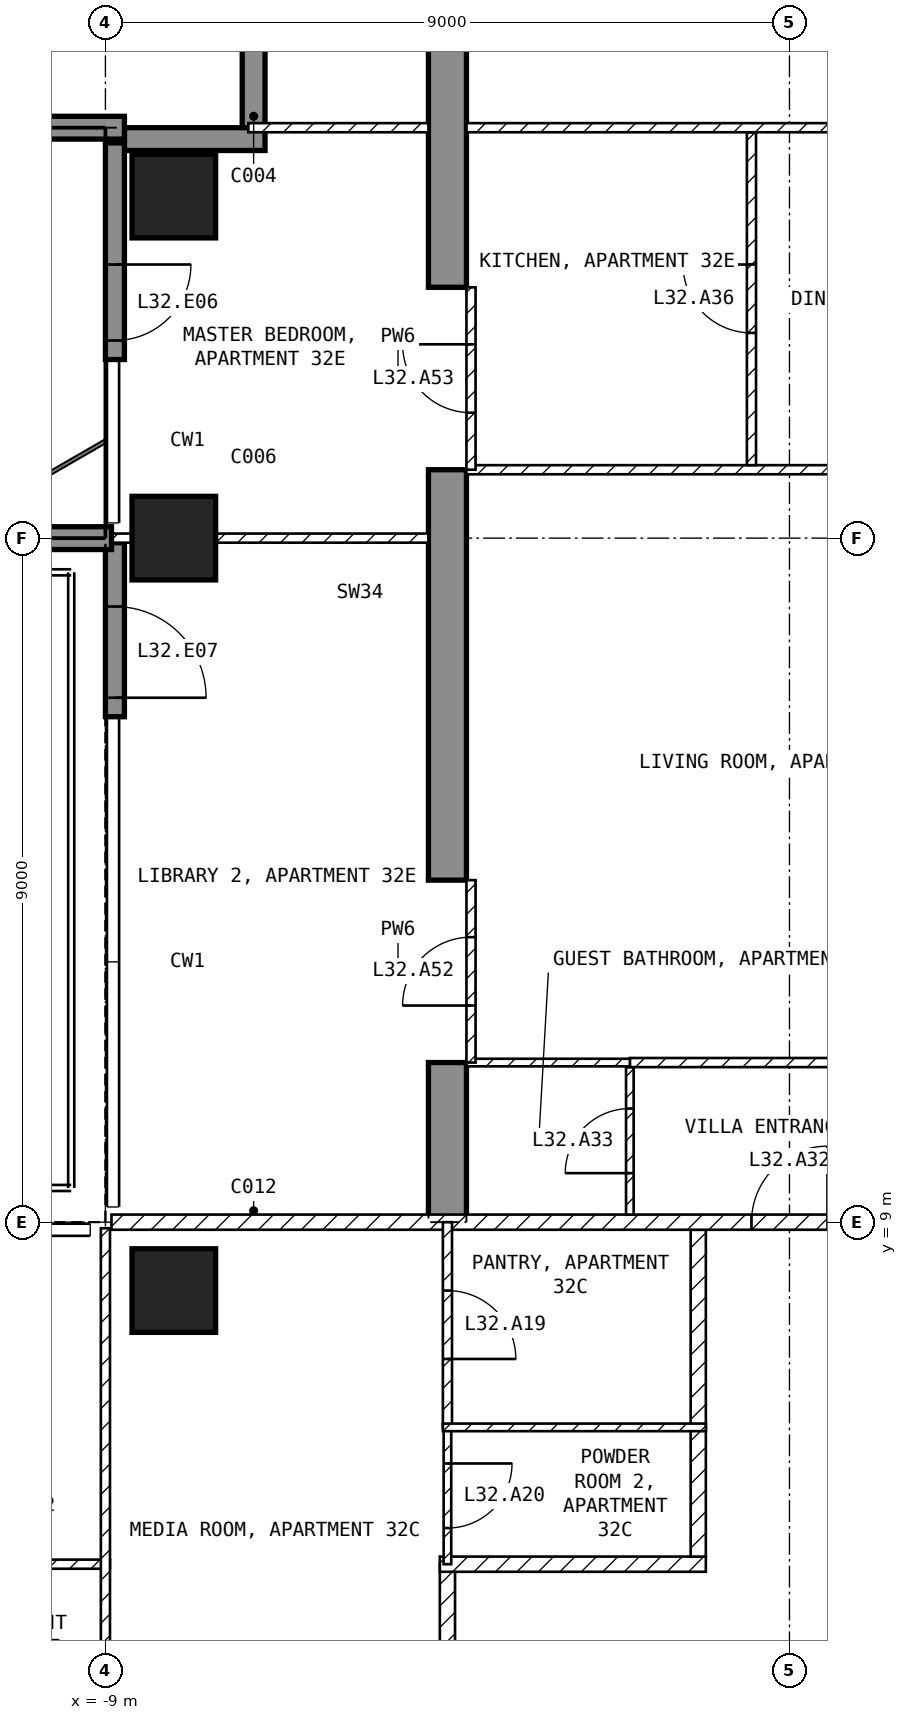
"""IFC4 building model, lengths in metres.
Left out: names, types, materials, properties, quantities, classifications, styles, units other than length and angle.
Written with IfcOpenShell. Run it as: python <this file> out.ifc"""

import sys

from ifc_helpers import new_model, si_unit, direction, frame, frame_2d, origin, origin_2d, place, context, subcontext, project, spatial, polyline, rectangle, outline, extrude, element, fill, save


model = new_model("IFC4")
c1 = context("Model", 3, precision=1e-05, world=origin(), true_north=direction((0.0, 1.0)))
c2 = subcontext(c1, "Body", "Model", "MODEL_VIEW")
j1 = project(units=[si_unit("LENGTHUNIT", "METRE"), si_unit("PLANEANGLEUNIT", "RADIAN")], contexts=[c1])
p1 = place(None, origin())
s1 = spatial("IfcSite", under=j1, at=p1, CompositionType="ELEMENT")
p2 = place(p1, origin())
s2 = spatial("IfcBuilding", under=s1, at=p2, CompositionType="ELEMENT")
p3 = place(p2, frame((0.0, 0.0, 133.9)))
s3 = spatial("IfcBuildingStorey", under=s2, at=p3, CompositionType="ELEMENT", Elevation=133.9)
for number, where, z_axis, x_axis in (
    (1, (-8.1, 8.1, -0.25), (0.0, 0.0, 1.0), (1.0, 0.0, 0.0)),
    (2, (-8.1, 18.0, -0.25), (0.0, 0.0, 1.0), (1.0, 0.0, 0.0)),
    (3, (-8.1, 22.5, -0.25), (0.0, 0.0, 1.0), (1.0, 0.0, 0.0)),
):
    element("IfcColumn", number, at=place(p3, frame(where, z_axis=z_axis, x_axis=x_axis)), inside=s3, PredefinedType="COLUMN", context=c2, shape_type="SweptSolid", body=[
        extrude(rectangle(XDim=1.1, YDim=1.1, at=origin_2d()), origin(), (0.0, 0.0, 1.0), 3.5),
    ])
p4 = place(p3, frame((-4.75, 9.0, -0.25), z_axis=(1.0, 0.0, 0.0), x_axis=(0.0, 1.0, 0.0)))
e4 = element("IfcWall", 4, at=p4, inside=s3, PredefinedType="SHEAR", context=c2, shape_type="SweptSolid", body=[
    extrude(outline(polyline([(0.0, 0.0), (2.1, 0.0), (2.1, 2.65), (4.5, 2.65), (4.5, 0.0), (9.9, 0.0), (9.9, 2.65), (12.3, 2.65), (12.3, 0.0), (16.55, 0.0), (16.55, 3.5), (0.0, 3.5), (0.0, 0.0)])), origin(), (0.0, 0.0, 1.0), 0.5),
])
p5 = place(p3, frame((-8.875, 23.2, 0.0), z_axis=(0.0, 0.0, 1.0), x_axis=(0.0, -1.0, 0.0)))
e5 = element("IfcWall", 5, at=p5, inside=s3, PredefinedType="SOLIDWALL", context=c2, shape_type="SweptSolid", body=[
    extrude(rectangle(XDim=2.85, YDim=0.25, at=frame_2d((1.425, 0.0))), origin(), (0.0, 0.0, 1.0), 3.25),
])
p6 = place(p5, frame((1.6, 0.0, 0.0)))
e6 = element("IfcOpeningElement", 6, at=p6, cuts=e5, PredefinedType="OPENING", context=c2, shape_type="SweptSolid", body=[
    extrude(rectangle(XDim=1.0, YDim=2.4, at=frame_2d((0.5, 1.2))), frame((0.0, 0.135, 0.0), z_axis=(0.0, -1.0, 0.0), x_axis=(1.0, 0.0, 0.0)), (0.0, 0.0, 1.0), 0.27),
])
p7 = place(p3, frame((-8.875, 17.94, 0.0), z_axis=(0.0, 0.0, 1.0), x_axis=(0.0, -1.0, 0.0)))
e7 = element("IfcWall", 7, at=p7, inside=s3, PredefinedType="SOLIDWALL", context=c2, shape_type="SweptSolid", body=[
    extrude(rectangle(XDim=2.29, YDim=0.25, at=frame_2d((1.145, 0.0))), origin(), (0.0, 0.0, 1.0), 3.25),
])
p8 = place(p7, frame((0.84, 0.0, 0.0)))
e8 = element("IfcOpeningElement", 8, at=p8, cuts=e7, PredefinedType="OPENING", context=c2, shape_type="SweptSolid", body=[
    extrude(rectangle(XDim=1.2, YDim=2.4, at=frame_2d((0.6, 1.2))), frame((0.0, 0.135, 0.0), z_axis=(0.0, -1.0, 0.0), x_axis=(1.0, 0.0, 0.0)), (0.0, 0.0, 1.0), 0.27),
])
p9 = place(p3, frame((-7.05, 25.2, 0.0), z_axis=(0.0, 0.0, 1.0), x_axis=(0.0, -1.0, 0.0)))
e9 = element("IfcWall", 9, at=p9, inside=s3, PredefinedType="SOLIDWALL", context=c2, shape_type="SweptSolid", body=[
    extrude(rectangle(XDim=1.8, YDim=0.3, at=frame_2d((0.9, 0.0))), origin(), (0.0, 0.0, 1.0), 3.25),
])
p10 = place(p3, frame((-6.9, 23.25, 0.0), z_axis=(0.0, 0.0, 1.0), x_axis=(-1.0, 0.0, 0.0)))
e10 = element("IfcWall", 10, at=p10, inside=s3, PredefinedType="SOLIDWALL", context=c2, shape_type="SweptSolid", body=[
    extrude(rectangle(XDim=1.85, YDim=0.3, at=frame_2d((0.925, 0.0))), origin(), (0.0, 0.0, 1.0), 3.25),
])
p11 = place(p3, frame((-8.92, 18.0, 0.0), z_axis=(0.0, 0.0, 1.0), x_axis=(-1.0, 0.0, 0.0)))
e11 = element("IfcWall", 11, at=p11, inside=s3, PredefinedType="SOLIDWALL", context=c2, shape_type="SweptSolid", body=[
    extrude(rectangle(XDim=2.82, YDim=0.3, at=frame_2d((1.41, 0.0))), origin(), (0.0, 0.0, 1.0), 3.25),
])
p12 = place(p3, frame((-8.75, 23.4, 0.0), z_axis=(0.0, 0.0, 1.0), x_axis=(-1.0, 0.0, 0.0)))
e12 = element("IfcWall", 12, at=p12, inside=s3, PredefinedType="SOLIDWALL", context=c2, shape_type="SweptSolid", body=[
    extrude(rectangle(XDim=2.95, YDim=0.3, at=frame_2d((1.475, 0.0))), origin(), (0.0, 0.0, 1.0), 3.25),
])
p13 = place(p3, frame((-4.5, 1.3, 0.0), z_axis=(0.0, 0.0, 1.0), x_axis=(0.0, 1.0, 0.0)))
e13 = element("IfcWall", 13, at=p13, inside=s3, PredefinedType="PARTITIONING", context=c2, shape_type="SweptSolid", body=[
    extrude(rectangle(XDim=3.2, YDim=0.2, at=frame_2d((1.6, 0.0))), origin(), (0.0, 0.0, 1.0), 3.25),
])
p14 = place(p3, frame((-4.6, 4.5, 0.0), z_axis=(0.0, 0.0, 1.0), x_axis=(1.0, 0.0, 0.0)))
e14 = element("IfcWall", 14, at=p14, inside=s3, PredefinedType="PARTITIONING", context=c2, shape_type="SweptSolid", body=[
    extrude(rectangle(XDim=3.5, YDim=0.2, at=frame_2d((1.75, 0.0))), origin(), (0.0, 0.0, 1.0), 3.25),
])
p15 = place(p3, frame((-1.2, 4.6, 0.0), z_axis=(0.0, 0.0, 1.0), x_axis=(0.0, 1.0, 0.0)))
e15 = element("IfcWall", 15, at=p15, inside=s3, PredefinedType="PARTITIONING", context=c2, shape_type="SweptSolid", body=[
    extrude(rectangle(XDim=4.3, YDim=0.2, at=frame_2d((2.15, 0.0))), origin(), (0.0, 0.0, 1.0), 3.25),
])
p16 = place(p3, frame((-8.92, 9.0, 0.0), z_axis=(0.0, 0.0, 1.0), x_axis=(1.0, 0.0, 0.0)))
e16 = element("IfcWall", 16, at=p16, inside=s3, PredefinedType="PARTITIONING", context=c2, shape_type="SweptSolid", body=[
    extrude(rectangle(XDim=17.84, YDim=0.2, at=frame_2d((8.92, 0.0))), origin(), (0.0, 0.0, 1.0), 3.25),
])
p17 = place(p16, frame((8.42, 0.0, 0.0)))
e17 = element("IfcOpeningElement", 17, at=p17, cuts=e16, PredefinedType="OPENING", context=c2, shape_type="SweptSolid", body=[
    extrude(rectangle(XDim=1.0, YDim=2.1, at=frame_2d((0.5, 1.05))), frame((0.0, 0.11, 0.0), z_axis=(0.0, -1.0, 0.0), x_axis=(1.0, 0.0, 0.0)), (0.0, 0.0, 1.0), 0.22),
])
p18 = place(p3, frame((-14.4, 4.5, 0.0), z_axis=(0.0, 0.0, 1.0), x_axis=(1.0, 0.0, 0.0)))
e18 = element("IfcWall", 18, at=p18, inside=s3, PredefinedType="PARTITIONING", context=c2, shape_type="SweptSolid", body=[
    extrude(rectangle(XDim=5.46, YDim=0.12, at=frame_2d((2.73, 0.0))), origin(), (0.0, 0.0, 1.0), 3.25),
])
p19 = place(p18, frame((3.75, 0.0, 0.0)))
e19 = element("IfcOpeningElement", 19, at=p19, cuts=e18, PredefinedType="OPENING", context=c2, shape_type="SweptSolid", body=[
    extrude(rectangle(XDim=0.9, YDim=2.1, at=frame_2d((0.45, 1.05))), frame((0.0, 0.07, 0.0), z_axis=(0.0, -1.0, 0.0), x_axis=(1.0, 0.0, 0.0)), (0.0, 0.0, 1.0), 0.14),
])
p20 = place(p3, frame((-9.0, 8.92, 0.0), z_axis=(0.0, 0.0, 1.0), x_axis=(0.0, -1.0, 0.0)))
e20 = element("IfcWall", 20, at=p20, inside=s3, PredefinedType="PARTITIONING", context=c2, shape_type="SweptSolid", body=[
    extrude(rectangle(XDim=7.62, YDim=0.12, at=frame_2d((3.81, 0.0))), origin(), (0.0, 0.0, 1.0), 3.25),
])
p21 = place(p20, frame((5.57, 0.0, 0.0)))
e21 = element("IfcOpeningElement", 21, at=p21, cuts=e20, PredefinedType="OPENING", context=c2, shape_type="SweptSolid", body=[
    extrude(rectangle(XDim=0.9, YDim=2.1, at=frame_2d((0.45, 1.05))), frame((0.0, 0.07, 0.0), z_axis=(0.0, -1.0, 0.0), x_axis=(1.0, 0.0, 0.0)), (0.0, 0.0, 1.0), 0.14),
])
p22 = place(p3, frame((-4.5, 6.3, 0.0), z_axis=(0.0, 0.0, 1.0), x_axis=(0.0, -1.0, 0.0)))
e22 = element("IfcWall", 22, at=p22, inside=s3, PredefinedType="PARTITIONING", context=c2, shape_type="SweptSolid", body=[
    extrude(rectangle(XDim=1.8, YDim=0.1, at=frame_2d((0.9, 0.0))), origin(), (0.0, 0.0, 1.0), 3.25),
])
p23 = place(p22, frame((0.475, 0.0, 0.0)))
e23 = element("IfcOpeningElement", 23, at=p23, cuts=e22, PredefinedType="OPENING", context=c2, shape_type="SweptSolid", body=[
    extrude(rectangle(XDim=0.85, YDim=2.1, at=frame_2d((0.425, 1.05))), frame((0.0, 0.06, 0.0), z_axis=(0.0, -1.0, 0.0), x_axis=(1.0, 0.0, 0.0)), (0.0, 0.0, 1.0), 0.12),
])
p24 = place(p3, frame((-4.5, 9.0, 0.0), z_axis=(0.0, 0.0, 1.0), x_axis=(0.0, -1.0, 0.0)))
e24 = element("IfcWall", 24, at=p24, inside=s3, PredefinedType="PARTITIONING", context=c2, shape_type="SweptSolid", body=[
    extrude(rectangle(XDim=2.7, YDim=0.12, at=frame_2d((1.35, 0.0))), origin(), (0.0, 0.0, 1.0), 3.25),
])
p25 = place(p24, frame((0.9, 0.0, 0.0)))
e25 = element("IfcOpeningElement", 25, at=p25, cuts=e24, PredefinedType="OPENING", context=c2, shape_type="SweptSolid", body=[
    extrude(rectangle(XDim=0.9, YDim=2.1, at=frame_2d((0.45, 1.05))), frame((0.0, 0.07, 0.0), z_axis=(0.0, -1.0, 0.0), x_axis=(1.0, 0.0, 0.0)), (0.0, 0.0, 1.0), 0.14),
])
p26 = place(p3, frame((-4.56, 6.3, 0.0), z_axis=(0.0, 0.0, 1.0), x_axis=(1.0, 0.0, 0.0)))
e26 = element("IfcWall", 26, at=p26, inside=s3, PredefinedType="PARTITIONING", context=c2, shape_type="SweptSolid", body=[
    extrude(rectangle(XDim=3.46, YDim=0.1, at=frame_2d((1.73, 0.0))), origin(), (0.0, 0.0, 1.0), 3.25),
])
p27 = place(p3, frame((-2.1, 9.1, 0.0), z_axis=(0.0, 0.0, 1.0), x_axis=(0.0, 1.0, 0.0)))
e27 = element("IfcWall", 27, at=p27, inside=s3, PredefinedType="PARTITIONING", context=c2, shape_type="SweptSolid", body=[
    extrude(rectangle(XDim=1.94, YDim=0.1, at=frame_2d((0.97, 0.0))), origin(), (0.0, 0.0, 1.0), 3.25),
])
p28 = place(p27, frame((0.545, 0.0, 0.0)))
e28 = element("IfcOpeningElement", 28, at=p28, cuts=e27, PredefinedType="OPENING", context=c2, shape_type="SweptSolid", body=[
    extrude(rectangle(XDim=0.85, YDim=2.1, at=frame_2d((0.425, 1.05))), frame((0.0, 0.06, 0.0), z_axis=(0.0, -1.0, 0.0), x_axis=(1.0, 0.0, 0.0)), (0.0, 0.0, 1.0), 0.12),
])
p29 = place(p3, frame((-2.1, 11.1, 0.0), z_axis=(0.0, 0.0, 1.0), x_axis=(1.0, 0.0, 0.0)))
e29 = element("IfcWall", 29, at=p29, inside=s3, PredefinedType="PARTITIONING", context=c2, shape_type="SweptSolid", body=[
    extrude(rectangle(XDim=6.35, YDim=0.12, at=frame_2d((3.175, 0.0))), origin(), (0.0, 0.0, 1.0), 3.25),
])
p30 = place(p29, frame((2.725, 0.0, 0.0)))
e30 = element("IfcOpeningElement", 30, at=p30, cuts=e29, PredefinedType="OPENING", context=c2, shape_type="SweptSolid", body=[
    extrude(rectangle(XDim=0.9, YDim=2.1, at=frame_2d((0.45, 1.05))), frame((0.0, 0.07, 0.0), z_axis=(0.0, -1.0, 0.0), x_axis=(1.0, 0.0, 0.0)), (0.0, 0.0, 1.0), 0.14),
])
p31 = place(p3, frame((-4.25, 11.1, 0.0), z_axis=(0.0, 0.0, 1.0), x_axis=(1.0, 0.0, 0.0)))
e31 = element("IfcWall", 31, at=p31, inside=s3, PredefinedType="PARTITIONING", context=c2, shape_type="SweptSolid", body=[
    extrude(rectangle(XDim=2.15, YDim=0.1, at=frame_2d((1.075, 0.0))), origin(), (0.0, 0.0, 1.0), 3.25),
])
p32 = place(p3, frame((-4.25, 18.9, 0.0), z_axis=(0.0, 0.0, 1.0), x_axis=(1.0, 0.0, 0.0)))
e32 = element("IfcWall", 32, at=p32, inside=s3, PredefinedType="PARTITIONING", context=c2, shape_type="SweptSolid", body=[
    extrude(rectangle(XDim=8.5, YDim=0.12, at=frame_2d((4.25, 0.0))), origin(), (0.0, 0.0, 1.0), 3.25),
])
p33 = place(p32, frame((5.675, 0.0, 0.0)))
e33 = element("IfcOpeningElement", 33, at=p33, cuts=e32, PredefinedType="OPENING", context=c2, shape_type="SweptSolid", body=[
    extrude(rectangle(XDim=0.9, YDim=2.1, at=frame_2d((0.45, 1.05))), frame((0.0, 0.07, 0.0), z_axis=(0.0, -1.0, 0.0), x_axis=(1.0, 0.0, 0.0)), (0.0, 0.0, 1.0), 0.14),
])
p34 = place(p3, frame((-0.5, 18.96, 0.0), z_axis=(0.0, 0.0, 1.0), x_axis=(0.0, 1.0, 0.0)))
e34 = element("IfcWall", 34, at=p34, inside=s3, PredefinedType="PARTITIONING", context=c2, shape_type="SweptSolid", body=[
    extrude(rectangle(XDim=4.38, YDim=0.12, at=frame_2d((2.19, 0.0))), origin(), (0.0, 0.0, 1.0), 3.25),
])
p35 = place(p34, frame((1.74, 0.0, 0.0)))
e35 = element("IfcOpeningElement", 35, at=p35, cuts=e34, PredefinedType="OPENING", context=c2, shape_type="SweptSolid", body=[
    extrude(rectangle(XDim=0.9, YDim=2.1, at=frame_2d((0.45, 1.05))), frame((0.0, 0.07, 0.0), z_axis=(0.0, -1.0, 0.0), x_axis=(1.0, 0.0, 0.0)), (0.0, 0.0, 1.0), 0.14),
])
p36 = place(p3, frame((-4.25, 23.4, 0.0), z_axis=(0.0, 0.0, 1.0), x_axis=(1.0, 0.0, 0.0)))
e36 = element("IfcWall", 36, at=p36, inside=s3, PredefinedType="PARTITIONING", context=c2, shape_type="SweptSolid", body=[
    extrude(rectangle(XDim=8.5, YDim=0.12, at=frame_2d((4.25, 0.0))), origin(), (0.0, 0.0, 1.0), 3.25),
])
p37 = place(p36, frame((5.675, 0.0, 0.0)))
e37 = element("IfcOpeningElement", 37, at=p37, cuts=e36, PredefinedType="OPENING", context=c2, shape_type="SweptSolid", body=[
    extrude(rectangle(XDim=0.9, YDim=2.1, at=frame_2d((0.45, 1.05))), frame((0.0, 0.07, 0.0), z_axis=(0.0, -1.0, 0.0), x_axis=(1.0, 0.0, 0.0)), (0.0, 0.0, 1.0), 0.14),
])
p38 = place(p3, frame((-8.92, 18.0, 0.0), z_axis=(0.0, 0.0, 1.0), x_axis=(1.0, 0.0, 0.0)))
e38 = element("IfcWall", 38, at=p38, inside=s3, PredefinedType="PARTITIONING", context=c2, shape_type="SweptSolid", body=[
    extrude(rectangle(XDim=4.17, YDim=0.12, at=frame_2d((2.085, 0.0))), origin(), (0.0, 0.0, 1.0), 2.414),
])
p39 = place(p3, frame((-7.12, 23.4, 0.0), z_axis=(0.0, 0.0, 1.0), x_axis=(1.0, 0.0, 0.0)))
e39 = element("IfcWall", 39, at=p39, inside=s3, PredefinedType="PARTITIONING", context=c2, shape_type="SweptSolid", body=[
    extrude(rectangle(XDim=2.37, YDim=0.12, at=frame_2d((1.185, 0.0))), origin(), (0.0, 0.0, 1.0), 3.25),
])
p40 = place(p3, frame((-4.19, 11.1, 0.0), z_axis=(0.0, 0.0, 1.0), x_axis=(0.0, 1.0, 0.0)))
e40 = element("IfcWall", 40, at=p40, inside=s3, PredefinedType="PARTITIONING", context=c2, shape_type="SweptSolid", body=[
    extrude(rectangle(XDim=2.4, YDim=0.12, at=frame_2d((1.2, 0.0))), origin(), (0.0, 0.0, 1.0), 2.4),
])
p41 = place(p40, frame((0.75, 0.0, 0.0)))
e41 = element("IfcOpeningElement", 41, at=p41, cuts=e40, PredefinedType="OPENING", context=c2, shape_type="SweptSolid", body=[
    extrude(rectangle(XDim=0.9, YDim=2.1, at=frame_2d((0.45, 1.05))), frame((0.0, 0.07, 0.0), z_axis=(0.0, -1.0, 0.0), x_axis=(1.0, 0.0, 0.0)), (0.0, 0.0, 1.0), 0.14),
])
p42 = place(p3, frame((-4.19, 18.9, 0.0), z_axis=(0.0, 0.0, 1.0), x_axis=(0.0, 1.0, 0.0)))
e42 = element("IfcWall", 42, at=p42, inside=s3, PredefinedType="PARTITIONING", context=c2, shape_type="SweptSolid", body=[
    extrude(rectangle(XDim=2.4, YDim=0.12, at=frame_2d((1.2, 0.0))), origin(), (0.0, 0.0, 1.0), 2.4),
])
p43 = place(p42, frame((0.75, 0.0, 0.0)))
e43 = element("IfcOpeningElement", 43, at=p43, cuts=e42, PredefinedType="OPENING", context=c2, shape_type="SweptSolid", body=[
    extrude(rectangle(XDim=0.9, YDim=2.1, at=frame_2d((0.45, 1.05))), frame((0.0, 0.07, 0.0), z_axis=(0.0, -1.0, 0.0), x_axis=(1.0, 0.0, 0.0)), (0.0, 0.0, 1.0), 0.14),
])
p44 = place(p6, origin())
e44 = element("IfcDoor", 44, at=p44, inside=s3, OperationType="SINGLE_SWING_LEFT", PredefinedType="DOOR", context=c2, shape_type="SweptSolid", body=[
    extrude(rectangle(XDim=1.0, YDim=2.4, at=frame_2d((0.5, 1.2))), frame((0.0, 0.025, 0.0), z_axis=(0.0, -1.0, 0.0), x_axis=(1.0, 0.0, 0.0)), (0.0, 0.0, 1.0), 0.05),
])
fill(e6, e44)
p45 = place(p8, origin())
e45 = element("IfcDoor", 45, at=p45, inside=s3, OperationType="SINGLE_SWING_RIGHT", PredefinedType="DOOR", context=c2, shape_type="SweptSolid", body=[
    extrude(rectangle(XDim=1.2, YDim=2.4, at=frame_2d((0.6, 1.2))), frame((0.0, 0.025, 0.0), z_axis=(0.0, -1.0, 0.0), x_axis=(1.0, 0.0, 0.0)), (0.0, 0.0, 1.0), 0.05),
])
fill(e8, e45)
p46 = place(p25, origin())
e46 = element("IfcDoor", 46, at=p46, inside=s3, OperationType="SINGLE_SWING_RIGHT", PredefinedType="DOOR", context=c2, shape_type="SweptSolid", body=[
    extrude(rectangle(XDim=0.9, YDim=2.1, at=frame_2d((0.45, 1.05))), frame((0.0, 0.025, 0.0), z_axis=(0.0, -1.0, 0.0), x_axis=(1.0, 0.0, 0.0)), (0.0, 0.0, 1.0), 0.05),
])
fill(e25, e46)
p47 = place(p23, origin())
e47 = element("IfcDoor", 47, at=p47, inside=s3, OperationType="SINGLE_SWING_LEFT", PredefinedType="DOOR", context=c2, shape_type="SweptSolid", body=[
    extrude(rectangle(XDim=0.85, YDim=2.1, at=frame_2d((0.425, 1.05))), frame((0.0, 0.025, 0.0), z_axis=(0.0, -1.0, 0.0), x_axis=(1.0, 0.0, 0.0)), (0.0, 0.0, 1.0), 0.05),
])
fill(e23, e47)
p48 = place(p17, origin())
e48 = element("IfcDoor", 48, at=p48, inside=s3, OperationType="SINGLE_SWING_RIGHT", PredefinedType="DOOR", context=c2, shape_type="SweptSolid", body=[
    extrude(rectangle(XDim=1.0, YDim=2.1, at=frame_2d((0.5, 1.05))), frame((0.0, 0.025, 0.0), z_axis=(0.0, -1.0, 0.0), x_axis=(1.0, 0.0, 0.0)), (0.0, 0.0, 1.0), 0.05),
])
fill(e17, e48)
p49 = place(p28, origin())
e49 = element("IfcDoor", 49, at=p49, inside=s3, OperationType="SINGLE_SWING_LEFT", PredefinedType="DOOR", context=c2, shape_type="SweptSolid", body=[
    extrude(rectangle(XDim=0.85, YDim=2.1, at=frame_2d((0.425, 1.05))), frame((0.0, 0.025, 0.0), z_axis=(0.0, -1.0, 0.0), x_axis=(1.0, 0.0, 0.0)), (0.0, 0.0, 1.0), 0.05),
])
fill(e28, e49)
p50 = place(p35, origin())
e50 = element("IfcDoor", 50, at=p50, inside=s3, OperationType="SINGLE_SWING_RIGHT", PredefinedType="DOOR", context=c2, shape_type="SweptSolid", body=[
    extrude(rectangle(XDim=0.9, YDim=2.1, at=frame_2d((0.45, 1.05))), frame((0.0, 0.025, 0.0), z_axis=(0.0, -1.0, 0.0), x_axis=(1.0, 0.0, 0.0)), (0.0, 0.0, 1.0), 0.05),
])
fill(e35, e50)
p51 = place(p41, origin())
e51 = element("IfcDoor", 51, at=p51, inside=s3, OperationType="SINGLE_SWING_LEFT", PredefinedType="DOOR", context=c2, shape_type="SweptSolid", body=[
    extrude(rectangle(XDim=0.9, YDim=2.1, at=frame_2d((0.45, 1.05))), frame((0.0, 0.025, 0.0), z_axis=(0.0, -1.0, 0.0), x_axis=(1.0, 0.0, 0.0)), (0.0, 0.0, 1.0), 0.05),
])
fill(e41, e51)
p52 = place(p43, origin())
e52 = element("IfcDoor", 52, at=p52, inside=s3, OperationType="SINGLE_SWING_RIGHT", PredefinedType="DOOR", context=c2, shape_type="SweptSolid", body=[
    extrude(rectangle(XDim=0.9, YDim=2.1, at=frame_2d((0.45, 1.05))), frame((0.0, 0.025, 0.0), z_axis=(0.0, -1.0, 0.0), x_axis=(1.0, 0.0, 0.0)), (0.0, 0.0, 1.0), 0.05),
])
fill(e43, e52)
save(model, sys.argv[1])
